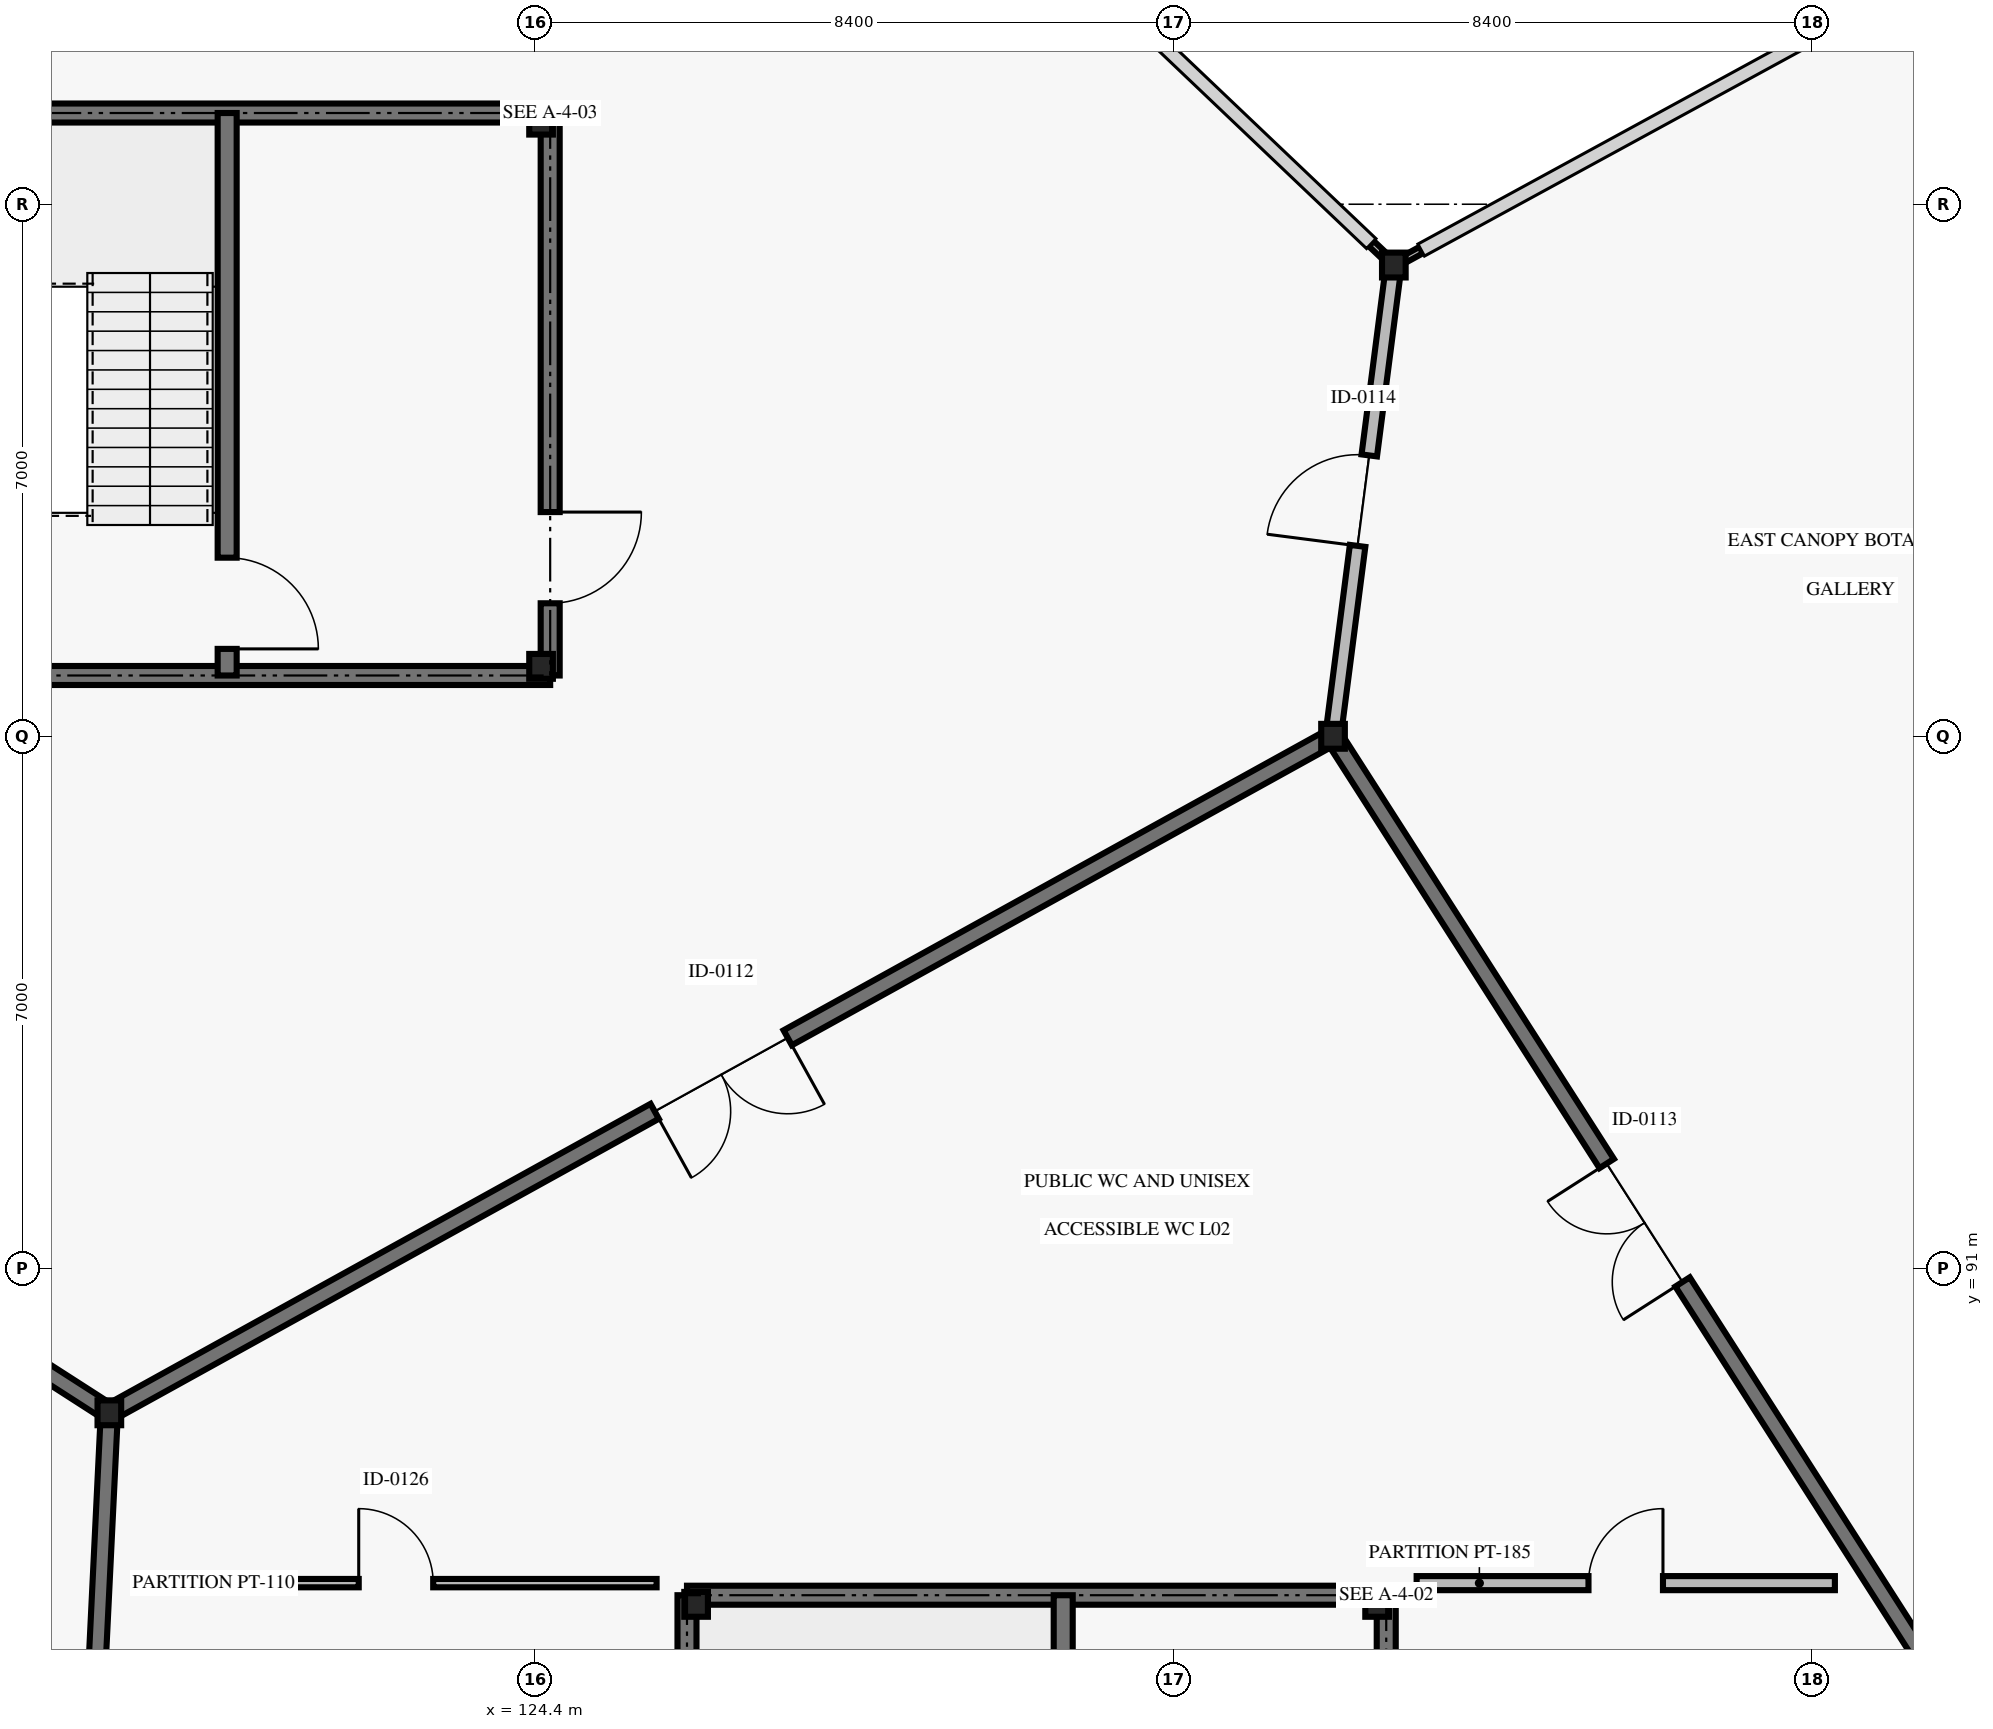
"""IFC4 building model, lengths in metres.
Left out: names, types, materials, properties, quantities, classifications, styles, units other than length and angle.
Written with IfcOpenShell. Run it as: python <this file> out.ifc"""

import sys

from ifc_helpers import new_model, si_unit, direction, frame, frame_2d, origin, origin_2d, place, context, subcontext, project, spatial, rectangle, i_section, extrude, element, fill, save


model = new_model("IFC4")
c1 = context("Model", 3, precision=1e-05, world=origin(), true_north=direction((0.0, 1.0)))
c2 = subcontext(c1, "Body", "Model", "MODEL_VIEW")
j1 = project(units=[si_unit("LENGTHUNIT", "METRE"), si_unit("PLANEANGLEUNIT", "RADIAN")], contexts=[c1])
p1 = place(None, origin())
s1 = spatial("IfcSite", under=j1, at=p1, CompositionType="ELEMENT")
p2 = place(p1, origin())
s2 = spatial("IfcBuilding", under=s1, at=p2, CompositionType="ELEMENT")
p3 = place(p2, frame((0.0, 0.0, 10.2)))
s3 = spatial("IfcBuildingStorey", under=s2, at=p3, CompositionType="ELEMENT", Elevation=10.2)
for number, where, z_axis, x_axis in (
    (1, (118.8, 89.1, 0.0), (0.0, 0.0, 1.0), (1.0, 0.0, 0.0)),
    (2, (134.9, 98.0, 0.0), (0.0, 0.0, 1.0), (1.0, 0.0, 0.0)),
    (3, (135.7, 104.2, 0.0), (0.0, 0.0, 1.0), (1.0, 0.0, 0.0)),
    (4, (135.48, 86.58, 0.0), (0.0, 0.0, 1.0), (1.0, 0.0, 0.0)),
    (5, (126.52, 86.58, 0.0), (0.0, 0.0, 1.0), (1.0, 0.0, 0.0)),
    (6, (124.48, 98.92, 0.0), (0.0, 0.0, 1.0), (1.0, 0.0, 0.0)),
    (7, (124.48, 106.08, 0.0), (0.0, 0.0, 1.0), (1.0, 0.0, 0.0)),
):
    element("IfcColumn", number, at=place(p3, frame(where, z_axis=z_axis, x_axis=x_axis)), inside=s3, PredefinedType="COLUMN", context=c2, shape_type="SweptSolid", body=[
        extrude(i_section(OverallWidth=0.311, OverallDepth=0.327, WebThickness=0.016, FlangeThickness=0.025, FilletRadius=0.017, at=origin_2d()), origin(), (0.0, 0.0, 1.0), 4.8),
    ])
p4 = place(p3, frame((135.403, 104.482, 0.0), z_axis=(0.0, 0.0, 1.0), x_axis=(0.726243974232, -0.687437044311, 0.0)))
e8 = element("IfcWall", 8, at=p4, inside=s3, PredefinedType="SOLIDWALL", context=c2, shape_type="SweptSolid", body=[
    extrude(rectangle(XDim=0.308, YDim=0.095, at=frame_2d((0.154, 0.0))), origin(), (0.0, 0.0, 1.0), 3.62),
])
p5 = place(p3, frame((135.79, 104.249, 0.0), z_axis=(0.0, 0.0, 1.0), x_axis=(0.876984894636, 0.480517944077, 0.0)))
e9 = element("IfcWall", 9, at=p5, inside=s3, PredefinedType="SOLIDWALL", context=c2, shape_type="SweptSolid", body=[
    extrude(rectangle(XDim=0.308, YDim=0.095, at=frame_2d((0.154, 0.0))), origin(), (0.0, 0.0, 1.0), 3.62),
])
p6 = place(p3, frame((117.9, 70.6, 0.0), z_axis=(0.0, 0.0, 1.0), x_axis=(0.048599072515, 0.998818366947, 0.0)))
e10 = element("IfcWall", 10, at=p6, inside=s3, PredefinedType="SOLIDWALL", context=c2, shape_type="SweptSolid", body=[
    extrude(rectangle(XDim=18.522, YDim=0.225, at=frame_2d((9.261, 0.0))), origin(), (0.0, 0.0, 1.0), 4.02),
])
p7 = place(p6, frame((8.336, 0.0, 0.0)))
e11 = element("IfcOpeningElement", 11, at=p7, cuts=e10, PredefinedType="OPENING", context=c2, shape_type="SweptSolid", body=[
    extrude(rectangle(XDim=1.85, YDim=2.4, at=frame_2d((0.925, 1.2))), frame((0.0, 0.123, 0.0), z_axis=(0.0, -1.0, 0.0), x_axis=(1.0, 0.0, 0.0)), (0.0, 0.0, 1.0), 0.245),
])
p8 = place(p3, frame((118.8, 89.1, 0.0), z_axis=(0.0, 0.0, 1.0), x_axis=(-0.841183241423, 0.540750177392, 0.0)))
e12 = element("IfcWall", 12, at=p8, inside=s3, PredefinedType="SOLIDWALL", context=c2, shape_type="SweptSolid", body=[
    extrude(rectangle(XDim=18.308, YDim=0.225, at=frame_2d((9.154, 0.0))), origin(), (0.0, 0.0, 1.0), 4.02),
])
p9 = place(p8, frame((8.054, 0.0, 0.0)))
e13 = element("IfcOpeningElement", 13, at=p9, cuts=e12, PredefinedType="OPENING", context=c2, shape_type="SweptSolid", body=[
    extrude(rectangle(XDim=2.2, YDim=2.6, at=frame_2d((1.1, 1.3))), frame((0.0, 0.123, 0.0), z_axis=(0.0, -1.0, 0.0), x_axis=(1.0, 0.0, 0.0)), (0.0, 0.0, 1.0), 0.245),
])
p10 = place(p3, frame((134.9, 98.0, 0.0), z_axis=(0.0, 0.0, 1.0), x_axis=(-0.875181353329, -0.483794996652, 0.0)))
e14 = element("IfcWall", 14, at=p10, inside=s3, PredefinedType="SOLIDWALL", context=c2, shape_type="SweptSolid", body=[
    extrude(rectangle(XDim=18.396, YDim=0.225, at=frame_2d((9.198, 0.0))), origin(), (0.0, 0.0, 1.0), 4.02),
])
p11 = place(p10, frame((8.198, 0.0, 0.0)))
e15 = element("IfcOpeningElement", 15, at=p11, cuts=e14, PredefinedType="OPENING", context=c2, shape_type="SweptSolid", body=[
    extrude(rectangle(XDim=2.0, YDim=2.5, at=frame_2d((1.0, 1.25))), frame((0.0, 0.123, 0.0), z_axis=(0.0, -1.0, 0.0), x_axis=(1.0, 0.0, 0.0)), (0.0, 0.0, 1.0), 0.245),
])
p12 = place(p3, frame((143.1, 85.2, 0.0), z_axis=(0.0, 0.0, 1.0), x_axis=(-0.539434641352, 0.842027474439, 0.0)))
e16 = element("IfcWall", 16, at=p12, inside=s3, PredefinedType="SOLIDWALL", context=c2, shape_type="SweptSolid", body=[
    extrude(rectangle(XDim=15.201, YDim=0.225, at=frame_2d((7.601, 0.0))), origin(), (0.0, 0.0, 1.0), 4.02),
])
p13 = place(p12, frame((6.676, 0.0, 0.0)))
e17 = element("IfcOpeningElement", 17, at=p13, cuts=e16, PredefinedType="OPENING", context=c2, shape_type="SweptSolid", body=[
    extrude(rectangle(XDim=1.85, YDim=2.4, at=frame_2d((0.925, 1.2))), frame((0.0, 0.123, 0.0), z_axis=(0.0, -1.0, 0.0), x_axis=(1.0, 0.0, 0.0)), (0.0, 0.0, 1.0), 0.245),
])
p14 = place(p3, frame((134.9, 98.0, 0.0), z_axis=(0.0, 0.0, 1.0), x_axis=(0.127980011854, 0.991776747341, 0.0)))
e18 = element("IfcWall", 18, at=p14, inside=s3, PredefinedType="SOLIDWALL", context=c2, shape_type="SweptSolid", body=[
    extrude(rectangle(XDim=6.251, YDim=0.205, at=frame_2d((3.126, 0.0))), origin(), (0.0, 0.0, 1.0), 3.32),
])
p15 = place(p14, frame((2.526, 0.0, 0.0)))
e19 = element("IfcOpeningElement", 19, at=p15, cuts=e18, PredefinedType="OPENING", context=c2, shape_type="SweptSolid", body=[
    extrude(rectangle(XDim=1.2, YDim=2.2, at=frame_2d((0.6, 1.1))), frame((0.0, 0.113, 0.0), z_axis=(0.0, -1.0, 0.0), x_axis=(1.0, 0.0, 0.0)), (0.0, 0.0, 1.0), 0.225),
])
p16 = place(p3, frame((119.142, 86.859, 0.0), z_axis=(0.0, 0.0, 1.0), x_axis=(1.0, 0.0, 0.0)))
e20 = element("IfcWall", 20, at=p16, inside=s3, PredefinedType="PARTITIONING", context=c2, shape_type="SweptSolid", body=[
    extrude(rectangle(XDim=6.858, YDim=0.11, at=frame_2d((3.429, 0.0))), origin(), (0.0, 0.0, 1.0), 3.32),
])
p17 = place(p16, frame((2.939, 0.0, 0.0)))
e21 = element("IfcOpeningElement", 21, at=p17, cuts=e20, PredefinedType="OPENING", context=c2, shape_type="SweptSolid", body=[
    extrude(rectangle(XDim=0.98, YDim=2.15, at=frame_2d((0.49, 1.075))), frame((0.0, 0.065, 0.0), z_axis=(0.0, -1.0, 0.0), x_axis=(1.0, 0.0, 0.0)), (0.0, 0.0, 1.0), 0.13),
])
p18 = place(p3, frame((136.0, 86.859, 0.0), z_axis=(0.0, 0.0, 1.0), x_axis=(1.0, 0.0, 0.0)))
e22 = element("IfcWall", 22, at=p18, inside=s3, PredefinedType="PARTITIONING", context=c2, shape_type="SweptSolid", body=[
    extrude(rectangle(XDim=5.503, YDim=0.185, at=frame_2d((2.751, 0.0))), origin(), (0.0, 0.0, 1.0), 3.32),
])
p19 = place(p18, frame((2.261, 0.0, 0.0)))
e23 = element("IfcOpeningElement", 23, at=p19, cuts=e22, PredefinedType="OPENING", context=c2, shape_type="SweptSolid", body=[
    extrude(rectangle(XDim=0.98, YDim=2.15, at=frame_2d((0.49, 1.075))), frame((0.0, 0.103, 0.0), z_axis=(0.0, -1.0, 0.0), x_axis=(1.0, 0.0, 0.0)), (0.0, 0.0, 1.0), 0.205),
])
p20 = place(p3, frame((126.4, 79.3, 0.0), z_axis=(0.0, 0.0, 1.0), x_axis=(0.0, 1.0, 0.0)))
e24 = element("IfcWall", 24, at=p20, inside=s3, PredefinedType="SHEAR", context=c2, shape_type="SweptSolid", body=[
    extrude(rectangle(XDim=7.4, YDim=0.25, at=frame_2d((3.7, 0.0))), origin(), (0.0, 0.0, 1.0), 4.56),
])
p21 = place(p3, frame((126.4, 86.7, 0.0), z_axis=(0.0, 0.0, 1.0), x_axis=(1.0, 0.0, 0.0)))
e25 = element("IfcWall", 25, at=p21, inside=s3, PredefinedType="SHEAR", context=c2, shape_type="SweptSolid", body=[
    extrude(rectangle(XDim=9.2, YDim=0.25, at=frame_2d((4.6, 0.0))), origin(), (0.0, 0.0, 1.0), 4.56),
])
p22 = place(p3, frame((135.6, 86.7, 0.0), z_axis=(0.0, 0.0, 1.0), x_axis=(0.0, -1.0, 0.0)))
e26 = element("IfcWall", 26, at=p22, inside=s3, PredefinedType="SHEAR", context=c2, shape_type="SweptSolid", body=[
    extrude(rectangle(XDim=7.4, YDim=0.25, at=frame_2d((3.7, 0.0))), origin(), (0.0, 0.0, 1.0), 4.56),
])
p23 = place(p22, frame((5.25, 0.0, 0.0)))
e27 = element("IfcOpeningElement", 27, at=p23, cuts=e26, PredefinedType="OPENING", context=c2, shape_type="SweptSolid", body=[
    extrude(rectangle(XDim=1.2, YDim=2.2, at=frame_2d((0.6, 1.1))), frame((0.0, 0.135, 0.0), z_axis=(0.0, -1.0, 0.0), x_axis=(1.0, 0.0, 0.0)), (0.0, 0.0, 1.0), 0.27),
])
p24 = place(p3, frame((131.35, 86.7, 0.0), z_axis=(0.0, 0.0, 1.0), x_axis=(0.0, -1.0, 0.0)))
e28 = element("IfcWall", 28, at=p24, inside=s3, PredefinedType="SHEAR", context=c2, shape_type="SweptSolid", body=[
    extrude(rectangle(XDim=7.4, YDim=0.25, at=frame_2d((3.7, 0.0))), origin(), (0.0, 0.0, 1.0), 4.56),
])
p25 = place(p24, frame((5.85, 0.0, 0.0)))
e29 = element("IfcOpeningElement", 29, at=p25, cuts=e28, PredefinedType="OPENING", context=c2, shape_type="SweptSolid", body=[
    extrude(rectangle(XDim=1.2, YDim=2.2, at=frame_2d((0.6, 1.1))), frame((0.0, 0.135, 0.0), z_axis=(0.0, -1.0, 0.0), x_axis=(1.0, 0.0, 0.0)), (0.0, 0.0, 1.0), 0.27),
])
for number, where, z_axis, x_axis in (
    (30, (115.4, 106.2, 0.0), (0.0, 0.0, 1.0), (1.0, 0.0, 0.0)),
    (31, (124.6, 98.8, 0.0), (0.0, 0.0, 1.0), (-1.0, 0.0, 0.0)),
):
    element("IfcWall", number, at=place(p3, frame(where, z_axis=z_axis, x_axis=x_axis)), inside=s3, PredefinedType="SHEAR", context=c2, shape_type="SweptSolid", body=[
        extrude(rectangle(XDim=9.2, YDim=0.25, at=frame_2d((4.6, 0.0))), origin(), (0.0, 0.0, 1.0), 4.56),
    ])
p26 = place(p3, frame((124.6, 106.2, 0.0), z_axis=(0.0, 0.0, 1.0), x_axis=(0.0, -1.0, 0.0)))
e32 = element("IfcWall", 32, at=p26, inside=s3, PredefinedType="SHEAR", context=c2, shape_type="SweptSolid", body=[
    extrude(rectangle(XDim=7.4, YDim=0.25, at=frame_2d((3.7, 0.0))), origin(), (0.0, 0.0, 1.0), 4.56),
])
p27 = place(p26, frame((5.25, 0.0, 0.0)))
e33 = element("IfcOpeningElement", 33, at=p27, cuts=e32, PredefinedType="OPENING", context=c2, shape_type="SweptSolid", body=[
    extrude(rectangle(XDim=1.2, YDim=2.2, at=frame_2d((0.6, 1.1))), frame((0.0, 0.135, 0.0), z_axis=(0.0, -1.0, 0.0), x_axis=(1.0, 0.0, 0.0)), (0.0, 0.0, 1.0), 0.27),
])
p28 = place(p3, frame((120.35, 106.2, 0.0), z_axis=(0.0, 0.0, 1.0), x_axis=(0.0, -1.0, 0.0)))
e34 = element("IfcWall", 34, at=p28, inside=s3, PredefinedType="SHEAR", context=c2, shape_type="SweptSolid", body=[
    extrude(rectangle(XDim=7.4, YDim=0.25, at=frame_2d((3.7, 0.0))), origin(), (0.0, 0.0, 1.0), 4.56),
])
p29 = place(p28, frame((5.85, 0.0, 0.0)))
e35 = element("IfcOpeningElement", 35, at=p29, cuts=e34, PredefinedType="OPENING", context=c2, shape_type="SweptSolid", body=[
    extrude(rectangle(XDim=1.2, YDim=2.2, at=frame_2d((0.6, 1.1))), frame((0.0, 0.135, 0.0), z_axis=(0.0, -1.0, 0.0), x_axis=(1.0, 0.0, 0.0)), (0.0, 0.0, 1.0), 0.27),
])
p30 = place(p11, origin())
e36 = element("IfcDoor", 36, at=p30, inside=s3, OperationType="DOUBLE_DOOR_SINGLE_SWING", PredefinedType="DOOR", context=c2, shape_type="SweptSolid", body=[
    extrude(rectangle(XDim=2.0, YDim=2.5, at=frame_2d((1.0, 1.25))), frame((0.0, 0.025, 0.0), z_axis=(0.0, -1.0, 0.0), x_axis=(1.0, 0.0, 0.0)), (0.0, 0.0, 1.0), 0.05),
])
fill(e15, e36)
p31 = place(p13, origin())
e37 = element("IfcDoor", 37, at=p31, inside=s3, OperationType="DOUBLE_DOOR_SINGLE_SWING", PredefinedType="DOOR", context=c2, shape_type="SweptSolid", body=[
    extrude(rectangle(XDim=1.85, YDim=2.4, at=frame_2d((0.925, 1.2))), frame((0.0, 0.025, 0.0), z_axis=(0.0, -1.0, 0.0), x_axis=(1.0, 0.0, 0.0)), (0.0, 0.0, 1.0), 0.05),
])
fill(e17, e37)
p32 = place(p15, origin())
e38 = element("IfcDoor", 38, at=p32, inside=s3, OperationType="SINGLE_SWING_LEFT", PredefinedType="DOOR", context=c2, shape_type="SweptSolid", body=[
    extrude(rectangle(XDim=1.2, YDim=2.2, at=frame_2d((0.6, 1.1))), frame((0.0, 0.025, 0.0), z_axis=(0.0, -1.0, 0.0), x_axis=(1.0, 0.0, 0.0)), (0.0, 0.0, 1.0), 0.05),
])
fill(e19, e38)
p33 = place(p17, origin())
e39 = element("IfcDoor", 39, at=p33, inside=s3, OperationType="SINGLE_SWING_LEFT", PredefinedType="DOOR", context=c2, shape_type="SweptSolid", body=[
    extrude(rectangle(XDim=0.98, YDim=2.15, at=frame_2d((0.49, 1.075))), frame((0.0, 0.025, 0.0), z_axis=(0.0, -1.0, 0.0), x_axis=(1.0, 0.0, 0.0)), (0.0, 0.0, 1.0), 0.05),
])
fill(e21, e39)
p34 = place(p19, origin())
e40 = element("IfcDoor", 40, at=p34, inside=s3, OperationType="SINGLE_SWING_RIGHT", PredefinedType="DOOR", context=c2, shape_type="SweptSolid", body=[
    extrude(rectangle(XDim=0.98, YDim=2.15, at=frame_2d((0.49, 1.075))), frame((0.0, 0.025, 0.0), z_axis=(0.0, -1.0, 0.0), x_axis=(1.0, 0.0, 0.0)), (0.0, 0.0, 1.0), 0.05),
])
fill(e23, e40)
p35 = place(p27, origin())
e41 = element("IfcDoor", 41, at=p35, inside=s3, OperationType="SINGLE_SWING_LEFT", PredefinedType="DOOR", context=c2, shape_type="SweptSolid", body=[
    extrude(rectangle(XDim=1.2, YDim=2.2, at=frame_2d((0.6, 1.1))), frame((0.0, 0.025, 0.0), z_axis=(0.0, -1.0, 0.0), x_axis=(1.0, 0.0, 0.0)), (0.0, 0.0, 1.0), 0.05),
])
fill(e33, e41)
p36 = place(p29, origin())
e42 = element("IfcDoor", 42, at=p36, inside=s3, OperationType="SINGLE_SWING_RIGHT", PredefinedType="DOOR", context=c2, shape_type="SweptSolid", body=[
    extrude(rectangle(XDim=1.2, YDim=2.2, at=frame_2d((0.6, 1.1))), frame((0.0, 0.025, 0.0), z_axis=(0.0, -1.0, 0.0), x_axis=(1.0, 0.0, 0.0)), (0.0, 0.0, 1.0), 0.05),
])
fill(e35, e42)
save(model, sys.argv[1])
